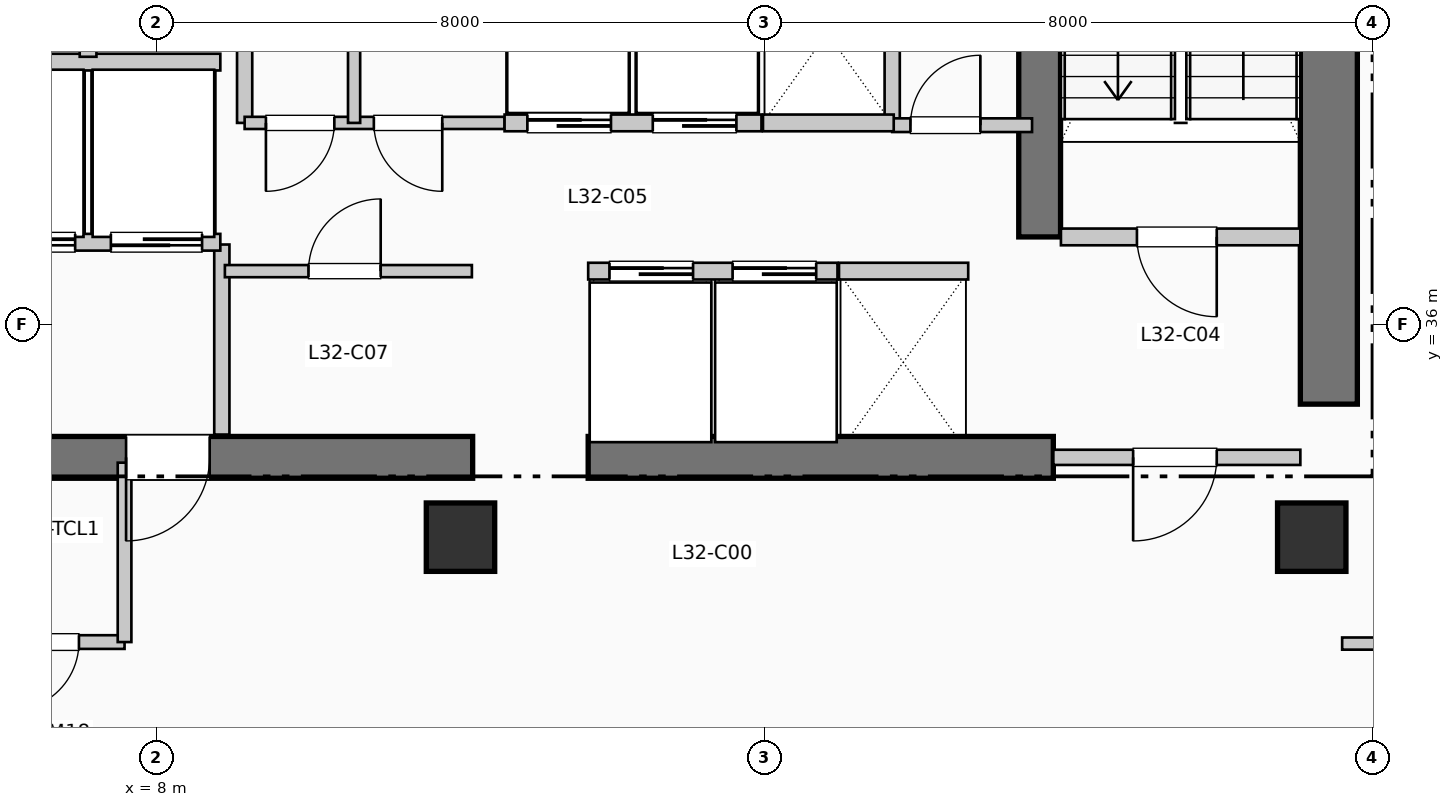
"""IFC4 building model, lengths in metres.
Left out: names, types, materials, properties, quantities, classifications, styles, units other than length and angle.
Written with IfcOpenShell. Run it as: python <this file> out.ifc"""

import sys

from ifc_helpers import new_model, si_unit, direction, frame, frame_2d, origin, origin_2d, place, context, subcontext, project, spatial, rectangle, extrude, element, fill, save


model = new_model("IFC4")
c1 = context("Model", 3, precision=1e-05, world=origin(), true_north=direction((0.0, 1.0)))
c2 = subcontext(c1, "Body", "Model", "MODEL_VIEW")
j1 = project(units=[si_unit("LENGTHUNIT", "METRE"), si_unit("PLANEANGLEUNIT", "RADIAN")], contexts=[c1])
p1 = place(None, origin())
s1 = spatial("IfcSite", under=j1, at=p1, CompositionType="ELEMENT")
p2 = place(p1, origin())
s2 = spatial("IfcBuilding", under=s1, at=p2, CompositionType="ELEMENT")
p3 = place(p2, frame((0.0, 0.0, 134.97)))
s3 = spatial("IfcBuildingStorey", under=s2, at=p3, CompositionType="ELEMENT", Elevation=134.97)
p4 = place(p3, frame((23.425, 34.95, 0.0), z_axis=(0.0, 0.0, 1.0), x_axis=(0.0, 1.0, 0.0)))
e1 = element("IfcWall", 1, at=p4, inside=s3, PredefinedType="SHEAR", context=c2, shape_type="SweptSolid", body=[
    extrude(rectangle(XDim=10.64, YDim=0.75, at=frame_2d((5.32, 0.0))), origin(), (0.0, 0.0, 1.0), 3.96),
])
p5 = place(p3, frame((1.45, 34.25, 0.0), z_axis=(0.0, 0.0, 1.0), x_axis=(1.0, 0.0, 0.0)))
e2 = element("IfcWall", 2, at=p5, inside=s3, PredefinedType="SHEAR", context=c2, shape_type="SweptSolid", body=[
    extrude(rectangle(XDim=10.71, YDim=0.55, at=frame_2d((5.355, 0.0))), origin(), (0.0, 0.0, 1.0), 3.96),
])
p6 = place(p5, frame((7.25, 0.0, 0.0), z_axis=(0.0, 0.0, 1.0), x_axis=(-1.0, 0.0, 0.0)))
e3 = element("IfcOpeningElement", 3, at=p6, cuts=e2, PredefinedType="OPENING", context=c2, shape_type="SweptSolid", body=[
    extrude(rectangle(XDim=1.1, YDim=2.15, at=frame_2d((0.55, 1.075))), frame((0.0, 0.285, 0.0), z_axis=(0.0, -1.0, 0.0), x_axis=(1.0, 0.0, 0.0)), (0.0, 0.0, 1.0), 0.57),
])
p7 = place(p3, frame((13.68, 34.25, 0.0), z_axis=(0.0, 0.0, 1.0), x_axis=(1.0, 0.0, 0.0)))
e4 = element("IfcWall", 4, at=p7, inside=s3, PredefinedType="SHEAR", context=c2, shape_type="SweptSolid", body=[
    extrude(rectangle(XDim=6.12, YDim=0.55, at=frame_2d((3.06, 0.0))), origin(), (0.0, 0.0, 1.0), 3.96),
])
p8 = place(p3, frame((19.62, 37.15, 0.0), z_axis=(0.0, 0.0, 1.0), x_axis=(0.0, 1.0, 0.0)))
e5 = element("IfcWall", 5, at=p8, inside=s3, PredefinedType="SHEAR", context=c2, shape_type="SweptSolid", body=[
    extrude(rectangle(XDim=7.89, YDim=0.55, at=frame_2d((3.945, 0.0))), origin(), (0.0, 0.0, 1.0), 3.96),
])
for number, where, z_axis, x_axis in (
    (6, (12.0, 33.2, 0.0), (0.0, 0.0, 1.0), (1.0, 0.0, 0.0)),
    (7, (23.2, 33.2, 0.0), (0.0, 0.0, 1.0), (1.0, 0.0, 0.0)),
):
    element("IfcColumn", number, at=place(p3, frame(where, z_axis=z_axis, x_axis=x_axis)), inside=s3, PredefinedType="COLUMN", context=c2, shape_type="SweptSolid", body=[
        extrude(rectangle(XDim=0.9, YDim=0.9, at=origin_2d()), origin(), (0.0, 0.0, 1.0), 3.96),
    ])
p9 = place(p3, frame((8.86, 34.55, 0.0), z_axis=(0.0, 0.0, 1.0), x_axis=(0.0, 1.0, 0.0)))
e8 = element("IfcWall", 8, at=p9, inside=s3, PredefinedType="PARTITIONING", context=c2, shape_type="SweptSolid", body=[
    extrude(rectangle(XDim=2.5, YDim=0.2, at=frame_2d((1.25, 0.0))), origin(), (0.0, 0.0, 1.0), 3.71),
])
p10 = place(p3, frame((19.9, 37.15, 0.0), z_axis=(0.0, 0.0, 1.0), x_axis=(1.0, 0.0, 0.0)))
e9 = element("IfcWall", 9, at=p10, inside=s3, PredefinedType="PARTITIONING", context=c2, shape_type="SweptSolid", body=[
    extrude(rectangle(XDim=3.15, YDim=0.22, at=frame_2d((1.575, 0.0))), origin(), (0.0, 0.0, 1.0), 3.71),
])
p11 = place(p10, frame((2.05, 0.0, 0.0), z_axis=(0.0, 0.0, 1.0), x_axis=(-1.0, 0.0, 0.0)))
e10 = element("IfcOpeningElement", 10, at=p11, cuts=e9, PredefinedType="OPENING", context=c2, shape_type="SweptSolid", body=[
    extrude(rectangle(XDim=1.05, YDim=2.15, at=frame_2d((0.525, 1.075))), frame((0.0, 0.12, 0.0), z_axis=(0.0, -1.0, 0.0), x_axis=(1.0, 0.0, 0.0)), (0.0, 0.0, 1.0), 0.24),
])
p12 = place(p3, frame((19.8, 34.25, 0.0), z_axis=(0.0, 0.0, 1.0), x_axis=(1.0, 0.0, 0.0)))
e11 = element("IfcWall", 11, at=p12, inside=s3, PredefinedType="PARTITIONING", context=c2, shape_type="SweptSolid", body=[
    extrude(rectangle(XDim=3.25, YDim=0.2, at=frame_2d((1.625, 0.0))), origin(), (0.0, 0.0, 1.0), 3.71),
])
p13 = place(p12, frame((2.15, 0.0, 0.0), z_axis=(0.0, 0.0, 1.0), x_axis=(-1.0, 0.0, 0.0)))
e12 = element("IfcOpeningElement", 12, at=p13, cuts=e11, PredefinedType="OPENING", context=c2, shape_type="SweptSolid", body=[
    extrude(rectangle(XDim=1.1, YDim=2.15, at=frame_2d((0.55, 1.075))), frame((0.0, 0.11, 0.0), z_axis=(0.0, -1.0, 0.0), x_axis=(1.0, 0.0, 0.0)), (0.0, 0.0, 1.0), 0.22),
])
p14 = place(p3, frame((5.38, 37.08, 0.0), z_axis=(0.0, 0.0, 1.0), x_axis=(1.0, 0.0, 0.0)))
e13 = element("IfcWall", 13, at=p14, inside=s3, PredefinedType="PARTITIONING", context=c2, shape_type="SweptSolid", body=[
    extrude(rectangle(XDim=3.46, YDim=0.22, at=frame_2d((1.73, 0.0))), origin(), (0.0, 0.0, 1.0), 3.71),
])
p15 = place(p14, frame((1.55, 0.0, 0.0), z_axis=(0.0, 0.0, 1.0), x_axis=(-1.0, 0.0, 0.0)))
e14 = element("IfcOpeningElement", 14, at=p15, cuts=e13, PredefinedType="OPENING", context=c2, shape_type="SweptSolid", body=[
    extrude(rectangle(XDim=1.2, YDim=2.2, at=frame_2d((0.6, 1.1))), frame((0.0, 0.12, 0.0), z_axis=(0.0, -1.0, 0.0), x_axis=(1.0, 0.0, 0.0)), (0.0, 0.0, 1.0), 0.24),
])
p16 = place(p14, frame((3.22, 0.0, 0.0), z_axis=(0.0, 0.0, 1.0), x_axis=(-1.0, 0.0, 0.0)))
e15 = element("IfcOpeningElement", 15, at=p16, cuts=e13, PredefinedType="OPENING", context=c2, shape_type="SweptSolid", body=[
    extrude(rectangle(XDim=1.2, YDim=2.2, at=frame_2d((0.6, 1.1))), frame((0.0, 0.12, 0.0), z_axis=(0.0, -1.0, 0.0), x_axis=(1.0, 0.0, 0.0)), (0.0, 0.0, 1.0), 0.24),
])
p17 = place(p3, frame((5.38, 39.45, 0.0), z_axis=(0.0, 0.0, 1.0), x_axis=(1.0, 0.0, 0.0)))
e16 = element("IfcWall", 16, at=p17, inside=s3, PredefinedType="PARTITIONING", context=c2, shape_type="SweptSolid", body=[
    extrude(rectangle(XDim=3.46, YDim=0.22, at=frame_2d((1.73, 0.0))), origin(), (0.0, 0.0, 1.0), 3.71),
])
p18 = place(p3, frame((7.1, 39.52, 0.0), z_axis=(0.0, 0.0, 1.0), x_axis=(0.0, 1.0, 0.0)))
e17 = element("IfcWall", 17, at=p18, inside=s3, PredefinedType="PARTITIONING", context=c2, shape_type="SweptSolid", body=[
    extrude(rectangle(XDim=2.93, YDim=0.22, at=frame_2d((1.465, 0.0))), origin(), (0.0, 0.0, 1.0), 3.71),
])
for number, where, z_axis, x_axis in (
    (18, (9.16, 38.65, 0.0), (0.0, 0.0, 1.0), (0.0, 1.0, 0.0)),
    (19, (17.68, 38.65, 0.0), (0.0, 0.0, 1.0), (0.0, 1.0, 0.0)),
):
    element("IfcWall", number, at=place(p3, frame(where, z_axis=z_axis, x_axis=x_axis)), inside=s3, PredefinedType="PARTITIONING", context=c2, shape_type="SweptSolid", body=[
        extrude(rectangle(XDim=2.35, YDim=0.2, at=frame_2d((1.175, 0.0))), origin(), (0.0, 0.0, 1.0), 3.71),
    ])
p19 = place(p3, frame((17.68, 38.62, 0.0), z_axis=(0.0, 0.0, 1.0), x_axis=(1.0, 0.0, 0.0)))
e20 = element("IfcWall", 20, at=p19, inside=s3, PredefinedType="PARTITIONING", context=c2, shape_type="SweptSolid", body=[
    extrude(rectangle(XDim=1.84, YDim=0.18, at=frame_2d((0.92, 0.0))), origin(), (0.0, 0.0, 1.0), 3.71),
])
p20 = place(p19, frame((0.24, 0.0, 0.0)))
e21 = element("IfcOpeningElement", 21, at=p20, cuts=e20, PredefinedType="OPENING", context=c2, shape_type="SweptSolid", body=[
    extrude(rectangle(XDim=0.92, YDim=2.1, at=frame_2d((0.46, 1.05))), frame((0.0, 0.1, 0.0), z_axis=(0.0, -1.0, 0.0), x_axis=(1.0, 0.0, 0.0)), (0.0, 0.0, 1.0), 0.2),
])
p21 = place(p3, frame((5.5, 31.82, 0.0), z_axis=(0.0, 0.0, 1.0), x_axis=(1.0, 0.0, 0.0)))
e22 = element("IfcWall", 22, at=p21, inside=s3, PredefinedType="PLUMBINGWALL", context=c2, shape_type="SweptSolid", body=[
    extrude(rectangle(XDim=2.08, YDim=0.18, at=frame_2d((1.04, 0.0))), origin(), (0.0, 0.0, 1.0), 3.71),
])
p22 = place(p21, frame((1.48, 0.0, 0.0), z_axis=(0.0, 0.0, 1.0), x_axis=(-1.0, 0.0, 0.0)))
e23 = element("IfcOpeningElement", 23, at=p22, cuts=e22, PredefinedType="OPENING", context=c2, shape_type="SweptSolid", body=[
    extrude(rectangle(XDim=0.9, YDim=2.1, at=frame_2d((0.45, 1.05))), frame((0.0, 0.1, 0.0), z_axis=(0.0, -1.0, 0.0), x_axis=(1.0, 0.0, 0.0)), (0.0, 0.0, 1.0), 0.2),
])
p23 = place(p3, frame((7.58, 31.82, 0.0), z_axis=(0.0, 0.0, 1.0), x_axis=(0.0, 1.0, 0.0)))
e24 = element("IfcWall", 24, at=p23, inside=s3, PredefinedType="PLUMBINGWALL", context=c2, shape_type="SweptSolid", body=[
    extrude(rectangle(XDim=2.36, YDim=0.18, at=frame_2d((1.18, 0.0))), origin(), (0.0, 0.0, 1.0), 3.71),
])
p24 = place(p3, frame((8.9, 36.7, 0.0), z_axis=(0.0, 0.0, 1.0), x_axis=(1.0, 0.0, 0.0)))
e25 = element("IfcWall", 25, at=p24, inside=s3, PredefinedType="PARTITIONING", context=c2, shape_type="SweptSolid", body=[
    extrude(rectangle(XDim=3.25, YDim=0.16, at=frame_2d((1.625, 0.0))), origin(), (0.0, 0.0, 1.0), 3.71),
])
p25 = place(p24, frame((1.1, 0.0, 0.0)))
e26 = element("IfcOpeningElement", 26, at=p25, cuts=e25, PredefinedType="OPENING", context=c2, shape_type="SweptSolid", body=[
    extrude(rectangle(XDim=0.95, YDim=2.15, at=frame_2d((0.475, 1.075))), frame((0.0, 0.09, 0.0), z_axis=(0.0, -1.0, 0.0), x_axis=(1.0, 0.0, 0.0)), (0.0, 0.0, 1.0), 0.18),
])
p26 = place(p3, frame((9.16, 38.65, 0.0), z_axis=(0.0, 0.0, 1.0), x_axis=(1.0, 0.0, 0.0)))
e27 = element("IfcWall", 27, at=p26, inside=s3, PredefinedType="PARTITIONING", context=c2, shape_type="SweptSolid", body=[
    extrude(rectangle(XDim=3.42, YDim=0.16, at=frame_2d((1.71, 0.0))), origin(), (0.0, 0.0, 1.0), 3.71),
])
p27 = place(p26, frame((1.18, 0.0, 0.0), z_axis=(0.0, 0.0, 1.0), x_axis=(-1.0, 0.0, 0.0)))
e28 = element("IfcOpeningElement", 28, at=p27, cuts=e27, PredefinedType="OPENING", context=c2, shape_type="SweptSolid", body=[
    extrude(rectangle(XDim=0.9, YDim=2.15, at=frame_2d((0.45, 1.075))), frame((0.0, 0.09, 0.0), z_axis=(0.0, -1.0, 0.0), x_axis=(1.0, 0.0, 0.0)), (0.0, 0.0, 1.0), 0.18),
])
p28 = place(p26, frame((2.6, 0.0, 0.0), z_axis=(0.0, 0.0, 1.0), x_axis=(-1.0, 0.0, 0.0)))
e29 = element("IfcOpeningElement", 29, at=p28, cuts=e27, PredefinedType="OPENING", context=c2, shape_type="SweptSolid", body=[
    extrude(rectangle(XDim=0.9, YDim=2.15, at=frame_2d((0.45, 1.075))), frame((0.0, 0.09, 0.0), z_axis=(0.0, -1.0, 0.0), x_axis=(1.0, 0.0, 0.0)), (0.0, 0.0, 1.0), 0.18),
])
p29 = place(p3, frame((10.6, 38.65, 0.0), z_axis=(0.0, 0.0, 1.0), x_axis=(0.0, 1.0, 0.0)))
e30 = element("IfcWall", 30, at=p29, inside=s3, PredefinedType="PARTITIONING", context=c2, shape_type="SweptSolid", body=[
    extrude(rectangle(XDim=2.35, YDim=0.16, at=frame_2d((1.175, 0.0))), origin(), (0.0, 0.0, 1.0), 3.71),
])
p30 = place(p3, frame((13.68, 36.7, 0.0), z_axis=(0.0, 0.0, 1.0), x_axis=(1.0, 0.0, 0.0)))
e31 = element("IfcWall", 31, at=p30, inside=s3, PredefinedType="PARTITIONING", context=c2, shape_type="SweptSolid", body=[
    extrude(rectangle(XDim=3.28, YDim=0.22, at=frame_2d((1.64, 0.0))), origin(), (0.0, 0.0, 1.0), 3.71),
])
p31 = place(p30, frame((0.28, 0.0, 0.0)))
e32 = element("IfcOpeningElement", 32, at=p31, cuts=e31, PredefinedType="OPENING", context=c2, shape_type="SweptSolid", body=[
    extrude(rectangle(XDim=1.1, YDim=2.2, at=frame_2d((0.55, 1.1))), frame((0.0, 0.12, 0.0), z_axis=(0.0, -1.0, 0.0), x_axis=(1.0, 0.0, 0.0)), (0.0, 0.0, 1.0), 0.24),
])
p32 = place(p30, frame((1.9, 0.0, 0.0)))
e33 = element("IfcOpeningElement", 33, at=p32, cuts=e31, PredefinedType="OPENING", context=c2, shape_type="SweptSolid", body=[
    extrude(rectangle(XDim=1.1, YDim=2.2, at=frame_2d((0.55, 1.1))), frame((0.0, 0.12, 0.0), z_axis=(0.0, -1.0, 0.0), x_axis=(1.0, 0.0, 0.0)), (0.0, 0.0, 1.0), 0.24),
])
p33 = place(p3, frame((12.58, 38.65, 0.0), z_axis=(0.0, 0.0, 1.0), x_axis=(1.0, 0.0, 0.0)))
e34 = element("IfcWall", 34, at=p33, inside=s3, PredefinedType="PARTITIONING", context=c2, shape_type="SweptSolid", body=[
    extrude(rectangle(XDim=3.38, YDim=0.22, at=frame_2d((1.69, 0.0))), origin(), (0.0, 0.0, 1.0), 3.71),
])
p34 = place(p33, frame((0.3, 0.0, 0.0)))
e35 = element("IfcOpeningElement", 35, at=p34, cuts=e34, PredefinedType="OPENING", context=c2, shape_type="SweptSolid", body=[
    extrude(rectangle(XDim=1.1, YDim=2.2, at=frame_2d((0.55, 1.1))), frame((0.0, 0.12, 0.0), z_axis=(0.0, -1.0, 0.0), x_axis=(1.0, 0.0, 0.0)), (0.0, 0.0, 1.0), 0.24),
])
p35 = place(p33, frame((1.95, 0.0, 0.0)))
e36 = element("IfcOpeningElement", 36, at=p35, cuts=e34, PredefinedType="OPENING", context=c2, shape_type="SweptSolid", body=[
    extrude(rectangle(XDim=1.1, YDim=2.2, at=frame_2d((0.55, 1.1))), frame((0.0, 0.12, 0.0), z_axis=(0.0, -1.0, 0.0), x_axis=(1.0, 0.0, 0.0)), (0.0, 0.0, 1.0), 0.24),
])
p36 = place(p3, frame((16.98, 36.7, 0.0), z_axis=(0.0, 0.0, 1.0), x_axis=(1.0, 0.0, 0.0)))
e37 = element("IfcWall", 37, at=p36, inside=s3, PredefinedType="PARTITIONING", context=c2, shape_type="SweptSolid", body=[
    extrude(rectangle(XDim=1.7, YDim=0.22, at=frame_2d((0.85, 0.0))), origin(), (0.0, 0.0, 1.0), 3.71),
])
p37 = place(p3, frame((15.98, 38.65, 0.0), z_axis=(0.0, 0.0, 1.0), x_axis=(1.0, 0.0, 0.0)))
e38 = element("IfcWall", 38, at=p37, inside=s3, PredefinedType="PARTITIONING", context=c2, shape_type="SweptSolid", body=[
    extrude(rectangle(XDim=1.72, YDim=0.22, at=frame_2d((0.86, 0.0))), origin(), (0.0, 0.0, 1.0), 3.71),
])
p38 = place(p3, frame((23.6, 31.8, 0.0), z_axis=(0.0, 0.0, 1.0), x_axis=(1.0, 0.0, 0.0)))
e39 = element("IfcWall", 39, at=p38, inside=s3, PredefinedType="PARTITIONING", context=c2, shape_type="SweptSolid", body=[
    extrude(rectangle(XDim=26.41, YDim=0.16, at=frame_2d((13.205, 0.0))), origin(), (0.0, 0.0, 1.0), 3.71),
])
p39 = place(p38, frame((2.43, 0.0, 0.0)))
e40 = element("IfcOpeningElement", 40, at=p39, cuts=e39, PredefinedType="OPENING", context=c2, shape_type="SweptSolid", body=[
    extrude(rectangle(XDim=0.95, YDim=2.15, at=frame_2d((0.475, 1.075))), frame((0.0, 0.09, 0.0), z_axis=(0.0, -1.0, 0.0), x_axis=(1.0, 0.0, 0.0)), (0.0, 0.0, 1.0), 0.18),
])
p40 = place(p38, frame((8.769, 0.0, 0.0)))
e41 = element("IfcOpeningElement", 41, at=p40, cuts=e39, PredefinedType="OPENING", context=c2, shape_type="SweptSolid", body=[
    extrude(rectangle(XDim=0.95, YDim=2.15, at=frame_2d((0.475, 1.075))), frame((0.0, 0.09, 0.0), z_axis=(0.0, -1.0, 0.0), x_axis=(1.0, 0.0, 0.0)), (0.0, 0.0, 1.0), 0.18),
])
p41 = place(p38, frame((16.767, 0.0, 0.0)))
e42 = element("IfcOpeningElement", 42, at=p41, cuts=e39, PredefinedType="OPENING", context=c2, shape_type="SweptSolid", body=[
    extrude(rectangle(XDim=0.95, YDim=2.15, at=frame_2d((0.475, 1.075))), frame((0.0, 0.09, 0.0), z_axis=(0.0, -1.0, 0.0), x_axis=(1.0, 0.0, 0.0)), (0.0, 0.0, 1.0), 0.18),
])
p42 = place(p38, frame((22.634, 0.0, 0.0)))
e43 = element("IfcOpeningElement", 43, at=p42, cuts=e39, PredefinedType="OPENING", context=c2, shape_type="SweptSolid", body=[
    extrude(rectangle(XDim=0.95, YDim=2.15, at=frame_2d((0.475, 1.075))), frame((0.0, 0.09, 0.0), z_axis=(0.0, -1.0, 0.0), x_axis=(1.0, 0.0, 0.0)), (0.0, 0.0, 1.0), 0.18),
])
p43 = place(p6, origin())
e44 = element("IfcDoor", 44, at=p43, inside=s3, OperationType="SINGLE_SWING_LEFT", PredefinedType="DOOR", context=c2, shape_type="SweptSolid", body=[
    extrude(rectangle(XDim=1.1, YDim=2.15, at=frame_2d((0.55, 1.075))), frame((0.0, 0.025, 0.0), z_axis=(0.0, -1.0, 0.0), x_axis=(1.0, 0.0, 0.0)), (0.0, 0.0, 1.0), 0.05),
])
fill(e3, e44)
p44 = place(p11, origin())
e45 = element("IfcDoor", 45, at=p44, inside=s3, OperationType="SINGLE_SWING_RIGHT", PredefinedType="DOOR", context=c2, shape_type="SweptSolid", body=[
    extrude(rectangle(XDim=1.05, YDim=2.15, at=frame_2d((0.525, 1.075))), frame((0.0, 0.025, 0.0), z_axis=(0.0, -1.0, 0.0), x_axis=(1.0, 0.0, 0.0)), (0.0, 0.0, 1.0), 0.05),
])
fill(e10, e45)
p45 = place(p13, origin())
e46 = element("IfcDoor", 46, at=p45, inside=s3, OperationType="SINGLE_SWING_LEFT", PredefinedType="DOOR", context=c2, shape_type="SweptSolid", body=[
    extrude(rectangle(XDim=1.1, YDim=2.15, at=frame_2d((0.55, 1.075))), frame((0.0, 0.025, 0.0), z_axis=(0.0, -1.0, 0.0), x_axis=(1.0, 0.0, 0.0)), (0.0, 0.0, 1.0), 0.05),
])
fill(e12, e46)
p46 = place(p15, origin())
e47 = element("IfcDoor", 47, at=p46, inside=s3, OperationType="SLIDING_TO_RIGHT", PredefinedType="DOOR", context=c2, shape_type="SweptSolid", body=[
    extrude(rectangle(XDim=1.2, YDim=2.2, at=frame_2d((0.6, 1.1))), frame((0.0, 0.025, 0.0), z_axis=(0.0, -1.0, 0.0), x_axis=(1.0, 0.0, 0.0)), (0.0, 0.0, 1.0), 0.05),
])
fill(e14, e47)
p47 = place(p16, origin())
e48 = element("IfcDoor", 48, at=p47, inside=s3, OperationType="SLIDING_TO_RIGHT", PredefinedType="DOOR", context=c2, shape_type="SweptSolid", body=[
    extrude(rectangle(XDim=1.2, YDim=2.2, at=frame_2d((0.6, 1.1))), frame((0.0, 0.025, 0.0), z_axis=(0.0, -1.0, 0.0), x_axis=(1.0, 0.0, 0.0)), (0.0, 0.0, 1.0), 0.05),
])
fill(e15, e48)
p48 = place(p20, origin())
e49 = element("IfcDoor", 49, at=p48, inside=s3, OperationType="SINGLE_SWING_RIGHT", PredefinedType="DOOR", context=c2, shape_type="SweptSolid", body=[
    extrude(rectangle(XDim=0.92, YDim=2.1, at=frame_2d((0.46, 1.05))), frame((0.0, 0.025, 0.0), z_axis=(0.0, -1.0, 0.0), x_axis=(1.0, 0.0, 0.0)), (0.0, 0.0, 1.0), 0.05),
])
fill(e21, e49)
p49 = place(p22, origin())
e50 = element("IfcDoor", 50, at=p49, inside=s3, OperationType="SINGLE_SWING_LEFT", PredefinedType="DOOR", context=c2, shape_type="SweptSolid", body=[
    extrude(rectangle(XDim=0.9, YDim=2.1, at=frame_2d((0.45, 1.05))), frame((0.0, 0.025, 0.0), z_axis=(0.0, -1.0, 0.0), x_axis=(1.0, 0.0, 0.0)), (0.0, 0.0, 1.0), 0.05),
])
fill(e23, e50)
p50 = place(p25, origin())
e51 = element("IfcDoor", 51, at=p50, inside=s3, OperationType="SINGLE_SWING_RIGHT", PredefinedType="DOOR", context=c2, shape_type="SweptSolid", body=[
    extrude(rectangle(XDim=0.95, YDim=2.15, at=frame_2d((0.475, 1.075))), frame((0.0, 0.025, 0.0), z_axis=(0.0, -1.0, 0.0), x_axis=(1.0, 0.0, 0.0)), (0.0, 0.0, 1.0), 0.05),
])
fill(e26, e51)
p51 = place(p27, origin())
e52 = element("IfcDoor", 52, at=p51, inside=s3, OperationType="SINGLE_SWING_LEFT", PredefinedType="DOOR", context=c2, shape_type="SweptSolid", body=[
    extrude(rectangle(XDim=0.9, YDim=2.15, at=frame_2d((0.45, 1.075))), frame((0.0, 0.025, 0.0), z_axis=(0.0, -1.0, 0.0), x_axis=(1.0, 0.0, 0.0)), (0.0, 0.0, 1.0), 0.05),
])
fill(e28, e52)
p52 = place(p28, origin())
e53 = element("IfcDoor", 53, at=p52, inside=s3, OperationType="SINGLE_SWING_RIGHT", PredefinedType="DOOR", context=c2, shape_type="SweptSolid", body=[
    extrude(rectangle(XDim=0.9, YDim=2.15, at=frame_2d((0.45, 1.075))), frame((0.0, 0.025, 0.0), z_axis=(0.0, -1.0, 0.0), x_axis=(1.0, 0.0, 0.0)), (0.0, 0.0, 1.0), 0.05),
])
fill(e29, e53)
p53 = place(p31, origin())
e54 = element("IfcDoor", 54, at=p53, inside=s3, OperationType="SLIDING_TO_RIGHT", PredefinedType="DOOR", context=c2, shape_type="SweptSolid", body=[
    extrude(rectangle(XDim=1.1, YDim=2.2, at=frame_2d((0.55, 1.1))), frame((0.0, 0.025, 0.0), z_axis=(0.0, -1.0, 0.0), x_axis=(1.0, 0.0, 0.0)), (0.0, 0.0, 1.0), 0.05),
])
fill(e32, e54)
p54 = place(p32, origin())
e55 = element("IfcDoor", 55, at=p54, inside=s3, OperationType="SLIDING_TO_RIGHT", PredefinedType="DOOR", context=c2, shape_type="SweptSolid", body=[
    extrude(rectangle(XDim=1.1, YDim=2.2, at=frame_2d((0.55, 1.1))), frame((0.0, 0.025, 0.0), z_axis=(0.0, -1.0, 0.0), x_axis=(1.0, 0.0, 0.0)), (0.0, 0.0, 1.0), 0.05),
])
fill(e33, e55)
p55 = place(p34, origin())
e56 = element("IfcDoor", 56, at=p55, inside=s3, OperationType="SLIDING_TO_RIGHT", PredefinedType="DOOR", context=c2, shape_type="SweptSolid", body=[
    extrude(rectangle(XDim=1.1, YDim=2.2, at=frame_2d((0.55, 1.1))), frame((0.0, 0.025, 0.0), z_axis=(0.0, -1.0, 0.0), x_axis=(1.0, 0.0, 0.0)), (0.0, 0.0, 1.0), 0.05),
])
fill(e35, e56)
p56 = place(p35, origin())
e57 = element("IfcDoor", 57, at=p56, inside=s3, OperationType="SLIDING_TO_RIGHT", PredefinedType="DOOR", context=c2, shape_type="SweptSolid", body=[
    extrude(rectangle(XDim=1.1, YDim=2.2, at=frame_2d((0.55, 1.1))), frame((0.0, 0.025, 0.0), z_axis=(0.0, -1.0, 0.0), x_axis=(1.0, 0.0, 0.0)), (0.0, 0.0, 1.0), 0.05),
])
fill(e36, e57)
save(model, sys.argv[1])
